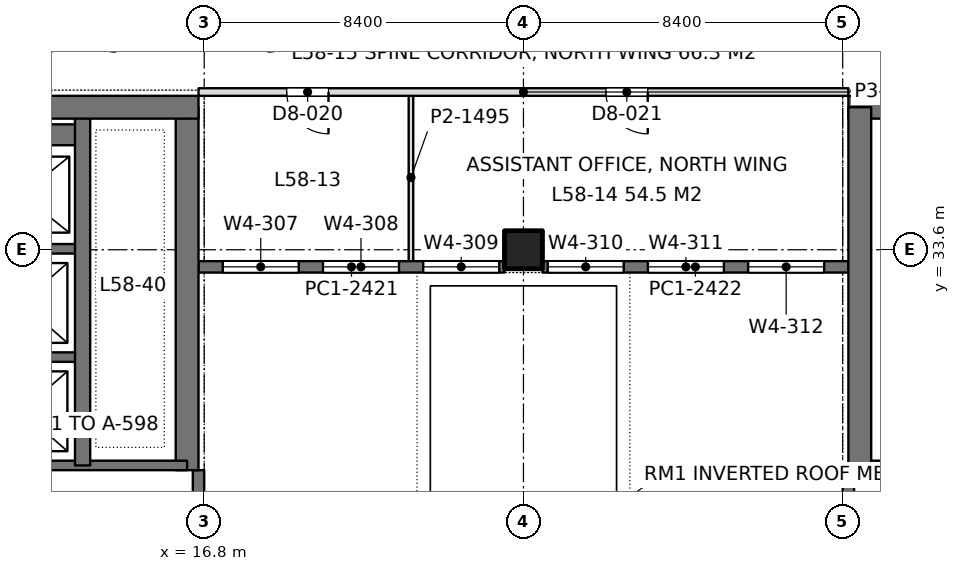
"""IFC4 building model, lengths in metres.
Left out: names, types, materials, properties, quantities, classifications, styles, units other than length and angle.
Written with IfcOpenShell. Run it as: python <this file> out.ifc"""

import sys

from ifc_helpers import new_model, si_unit, direction, frame, frame_2d, origin, origin_2d, place, context, subcontext, project, spatial, rectangle, extrude, element, fill, save


model = new_model("IFC4")
c1 = context("Model", 3, precision=1e-05, world=origin(), true_north=direction((0.0, 1.0)))
c2 = subcontext(c1, "Body", "Model", "MODEL_VIEW")
j1 = project(units=[si_unit("LENGTHUNIT", "METRE"), si_unit("PLANEANGLEUNIT", "RADIAN")], contexts=[c1])
p1 = place(None, origin())
s1 = spatial("IfcSite", under=j1, at=p1, CompositionType="ELEMENT")
p2 = place(p1, origin())
s2 = spatial("IfcBuilding", under=s1, at=p2, CompositionType="ELEMENT")
p3 = place(p2, frame((0.0, 0.0, 254.7)))
s3 = spatial("IfcBuildingStorey", under=s2, at=p3, CompositionType="ELEMENT", Elevation=254.7)
p4 = place(p3, frame((25.2, 33.6, 0.0), z_axis=(0.0, 0.0, 1.0), x_axis=(1.0, 0.0, 0.0)))
e1 = element("IfcColumn", 1, at=p4, inside=s3, PredefinedType="COLUMN", context=c2, shape_type="SweptSolid", body=[
    extrude(rectangle(XDim=1.0, YDim=1.0, at=origin_2d()), origin(), (0.0, 0.0, 1.0), 4.5),
])
p5 = place(p3, frame((-1.05, 37.35, 0.0), z_axis=(0.0, 0.0, 1.0), x_axis=(1.0, 0.0, 0.0)))
e2 = element("IfcWall", 2, at=p5, inside=s3, PredefinedType="SHEAR", context=c2, shape_type="SweptSolid", body=[
    extrude(rectangle(XDim=17.7, YDim=0.6, at=frame_2d((8.85, 0.0))), origin(), (0.0, 0.0, 1.0), 4.5),
])
p6 = place(p5, frame((8.8, 0.0, 0.0)))
e3 = element("IfcOpeningElement", 3, at=p6, cuts=e2, PredefinedType="OPENING", context=c2, shape_type="SweptSolid", body=[
    extrude(rectangle(XDim=1.8, YDim=2.4, at=frame_2d((0.9, 1.2))), frame((0.0, 0.31, 0.0), z_axis=(0.0, -1.0, 0.0), x_axis=(1.0, 0.0, 0.0)), (0.0, 0.0, 1.0), 0.62),
])
p7 = place(p3, frame((16.35, 27.8, 0.0), z_axis=(0.0, 0.0, 1.0), x_axis=(0.0, 1.0, 0.0)))
e4 = element("IfcWall", 4, at=p7, inside=s3, PredefinedType="SHEAR", context=c2, shape_type="SweptSolid", body=[
    extrude(rectangle(XDim=9.55, YDim=0.6, at=frame_2d((4.775, 0.0))), origin(), (0.0, 0.0, 1.0), 4.5),
])
p8 = place(p3, frame((13.6, 27.925, 0.0), z_axis=(0.0, 0.0, 1.0), x_axis=(0.0, 1.0, 0.0)))
e5 = element("IfcWall", 5, at=p8, inside=s3, PredefinedType="SHEAR", context=c2, shape_type="SweptSolid", body=[
    extrude(rectangle(XDim=9.425, YDim=0.4, at=frame_2d((4.712, 0.0))), origin(), (0.0, 0.0, 1.0), 4.5),
])
p9 = place(p3, frame((10.4, 27.925, 0.0), z_axis=(0.0, 0.0, 1.0), x_axis=(1.0, 0.0, 0.0)))
e6 = element("IfcWall", 6, at=p9, inside=s3, PredefinedType="SHEAR", context=c2, shape_type="SweptSolid", body=[
    extrude(rectangle(XDim=5.95, YDim=0.25, at=frame_2d((2.975, 0.0))), origin(), (0.0, 0.0, 1.0), 4.5),
])
for number, where, z_axis, x_axis in (
    (7, (10.4, 30.775, 0.0), (0.0, 0.0, 1.0), (1.0, 0.0, 0.0)),
    (8, (10.4, 33.625, 0.0), (0.0, 0.0, 1.0), (1.0, 0.0, 0.0)),
):
    element("IfcWall", number, at=place(p3, frame(where, z_axis=z_axis, x_axis=x_axis)), inside=s3, PredefinedType="SHEAR", context=c2, shape_type="SweptSolid", body=[
        extrude(rectangle(XDim=3.2, YDim=0.25, at=frame_2d((1.6, 0.0))), origin(), (0.0, 0.0, 1.0), 4.5),
    ])
p10 = place(p3, frame((10.4, 36.625, 0.0), z_axis=(0.0, 0.0, 1.0), x_axis=(1.0, 0.0, 0.0)))
e9 = element("IfcWall", 9, at=p10, inside=s3, PredefinedType="SHEAR", context=c2, shape_type="SweptSolid", body=[
    extrude(rectangle(XDim=3.2, YDim=0.55, at=frame_2d((1.6, 0.0))), origin(), (0.0, 0.0, 1.0), 4.5),
])
p11 = place(p3, frame((33.75, 37.35, 0.0), z_axis=(0.0, 0.0, 1.0), x_axis=(1.0, 0.0, 0.0)))
e10 = element("IfcWall", 10, at=p11, inside=s3, PredefinedType="SHEAR", context=c2, shape_type="SweptSolid", body=[
    extrude(rectangle(XDim=17.7, YDim=0.6, at=frame_2d((8.85, 0.0))), origin(), (0.0, 0.0, 1.0), 4.5),
])
p12 = place(p11, frame((7.1, 0.0, 0.0)))
e11 = element("IfcOpeningElement", 11, at=p12, cuts=e10, PredefinedType="OPENING", context=c2, shape_type="SweptSolid", body=[
    extrude(rectangle(XDim=1.8, YDim=2.4, at=frame_2d((0.9, 1.2))), frame((0.0, 0.31, 0.0), z_axis=(0.0, -1.0, 0.0), x_axis=(1.0, 0.0, 0.0)), (0.0, 0.0, 1.0), 0.62),
])
p13 = place(p3, frame((34.05, 27.8, 0.0), z_axis=(0.0, 0.0, 1.0), x_axis=(0.0, 1.0, 0.0)))
e12 = element("IfcWall", 12, at=p13, inside=s3, PredefinedType="SHEAR", context=c2, shape_type="SweptSolid", body=[
    extrude(rectangle(XDim=9.55, YDim=0.6, at=frame_2d((4.775, 0.0))), origin(), (0.0, 0.0, 1.0), 4.5),
])
p14 = place(p3, frame((40.0, 27.925, 0.0), z_axis=(0.0, 0.0, 1.0), x_axis=(-1.0, 0.0, 0.0)))
e13 = element("IfcWall", 13, at=p14, inside=s3, PredefinedType="SHEAR", context=c2, shape_type="SweptSolid", body=[
    extrude(rectangle(XDim=5.95, YDim=0.25, at=frame_2d((2.975, 0.0))), origin(), (0.0, 0.0, 1.0), 4.5),
])
p15 = place(p3, frame((16.65, 17.1, 0.0), z_axis=(0.0, 0.0, 1.0), x_axis=(0.0, 1.0, 0.0)))
e14 = element("IfcWall", 14, at=p15, inside=s3, PredefinedType="SOLIDWALL", context=c2, shape_type="SweptSolid", body=[
    extrude(rectangle(XDim=10.7, YDim=0.3, at=frame_2d((5.35, 0.0))), origin(), (0.0, 0.0, 1.0), 4.35),
])
p16 = place(p15, frame((0.55, 0.0, 0.9)))
e15 = element("IfcOpeningElement", 15, at=p16, cuts=e14, PredefinedType="OPENING", context=c2, shape_type="SweptSolid", body=[
    extrude(rectangle(XDim=2.0, YDim=1.9, at=frame_2d((1.0, 0.95))), frame((0.0, 0.16, 0.0), z_axis=(0.0, -1.0, 0.0), x_axis=(1.0, 0.0, 0.0)), (0.0, 0.0, 1.0), 0.32),
])
p17 = place(p15, frame((2.9, 0.0, 0.9)))
e16 = element("IfcOpeningElement", 16, at=p17, cuts=e14, PredefinedType="OPENING", context=c2, shape_type="SweptSolid", body=[
    extrude(rectangle(XDim=2.0, YDim=1.9, at=frame_2d((1.0, 0.95))), frame((0.0, 0.16, 0.0), z_axis=(0.0, -1.0, 0.0), x_axis=(1.0, 0.0, 0.0)), (0.0, 0.0, 1.0), 0.32),
])
p18 = place(p15, frame((7.675, 0.0, 0.9)))
e17 = element("IfcOpeningElement", 17, at=p18, cuts=e14, PredefinedType="OPENING", context=c2, shape_type="SweptSolid", body=[
    extrude(rectangle(XDim=2.0, YDim=1.9, at=frame_2d((1.0, 0.95))), frame((0.0, 0.16, 0.0), z_axis=(0.0, -1.0, 0.0), x_axis=(1.0, 0.0, 0.0)), (0.0, 0.0, 1.0), 0.32),
])
p19 = place(p3, frame((33.75, 17.1, 0.0), z_axis=(0.0, 0.0, 1.0), x_axis=(0.0, 1.0, 0.0)))
e18 = element("IfcWall", 18, at=p19, inside=s3, PredefinedType="SOLIDWALL", context=c2, shape_type="SweptSolid", body=[
    extrude(rectangle(XDim=10.7, YDim=0.3, at=frame_2d((5.35, 0.0))), origin(), (0.0, 0.0, 1.0), 4.35),
])
p20 = place(p19, frame((0.55, 0.0, 0.9)))
e19 = element("IfcOpeningElement", 19, at=p20, cuts=e18, PredefinedType="OPENING", context=c2, shape_type="SweptSolid", body=[
    extrude(rectangle(XDim=2.0, YDim=1.9, at=frame_2d((1.0, 0.95))), frame((0.0, 0.16, 0.0), z_axis=(0.0, -1.0, 0.0), x_axis=(1.0, 0.0, 0.0)), (0.0, 0.0, 1.0), 0.32),
])
p21 = place(p19, frame((2.9, 0.0, 0.9)))
e20 = element("IfcOpeningElement", 20, at=p21, cuts=e18, PredefinedType="OPENING", context=c2, shape_type="SweptSolid", body=[
    extrude(rectangle(XDim=2.0, YDim=1.9, at=frame_2d((1.0, 0.95))), frame((0.0, 0.16, 0.0), z_axis=(0.0, -1.0, 0.0), x_axis=(1.0, 0.0, 0.0)), (0.0, 0.0, 1.0), 0.32),
])
p22 = place(p19, frame((7.675, 0.0, 0.9)))
e21 = element("IfcOpeningElement", 21, at=p22, cuts=e18, PredefinedType="OPENING", context=c2, shape_type="SweptSolid", body=[
    extrude(rectangle(XDim=2.0, YDim=1.9, at=frame_2d((1.0, 0.95))), frame((0.0, 0.16, 0.0), z_axis=(0.0, -1.0, 0.0), x_axis=(1.0, 0.0, 0.0)), (0.0, 0.0, 1.0), 0.32),
])
p23 = place(p3, frame((16.65, 33.15, 0.0), z_axis=(0.0, 0.0, 1.0), x_axis=(1.0, 0.0, 0.0)))
e22 = element("IfcWall", 22, at=p23, inside=s3, PredefinedType="SOLIDWALL", context=c2, shape_type="SweptSolid", body=[
    extrude(rectangle(XDim=8.05, YDim=0.3, at=frame_2d((4.025, 0.0))), origin(), (0.0, 0.0, 1.0), 4.35),
])
p24 = place(p23, frame((0.637, 0.0, 0.9)))
e23 = element("IfcOpeningElement", 23, at=p24, cuts=e22, PredefinedType="OPENING", context=c2, shape_type="SweptSolid", body=[
    extrude(rectangle(XDim=2.0, YDim=1.9, at=frame_2d((1.0, 0.95))), frame((0.0, 0.16, 0.0), z_axis=(0.0, -1.0, 0.0), x_axis=(1.0, 0.0, 0.0)), (0.0, 0.0, 1.0), 0.32),
])
p25 = place(p23, frame((3.275, 0.0, 0.9)))
e24 = element("IfcOpeningElement", 24, at=p25, cuts=e22, PredefinedType="OPENING", context=c2, shape_type="SweptSolid", body=[
    extrude(rectangle(XDim=2.0, YDim=1.9, at=frame_2d((1.0, 0.95))), frame((0.0, 0.16, 0.0), z_axis=(0.0, -1.0, 0.0), x_axis=(1.0, 0.0, 0.0)), (0.0, 0.0, 1.0), 0.32),
])
p26 = place(p23, frame((5.913, 0.0, 0.9)))
e25 = element("IfcOpeningElement", 25, at=p26, cuts=e22, PredefinedType="OPENING", context=c2, shape_type="SweptSolid", body=[
    extrude(rectangle(XDim=2.0, YDim=1.9, at=frame_2d((1.0, 0.95))), frame((0.0, 0.16, 0.0), z_axis=(0.0, -1.0, 0.0), x_axis=(1.0, 0.0, 0.0)), (0.0, 0.0, 1.0), 0.32),
])
p27 = place(p3, frame((25.7, 33.15, 0.0), z_axis=(0.0, 0.0, 1.0), x_axis=(1.0, 0.0, 0.0)))
e26 = element("IfcWall", 26, at=p27, inside=s3, PredefinedType="SOLIDWALL", context=c2, shape_type="SweptSolid", body=[
    extrude(rectangle(XDim=8.05, YDim=0.3, at=frame_2d((4.025, 0.0))), origin(), (0.0, 0.0, 1.0), 4.35),
])
p28 = place(p27, frame((0.137, 0.0, 0.9)))
e27 = element("IfcOpeningElement", 27, at=p28, cuts=e26, PredefinedType="OPENING", context=c2, shape_type="SweptSolid", body=[
    extrude(rectangle(XDim=2.0, YDim=1.9, at=frame_2d((1.0, 0.95))), frame((0.0, 0.16, 0.0), z_axis=(0.0, -1.0, 0.0), x_axis=(1.0, 0.0, 0.0)), (0.0, 0.0, 1.0), 0.32),
])
p29 = place(p27, frame((2.775, 0.0, 0.9)))
e28 = element("IfcOpeningElement", 28, at=p29, cuts=e26, PredefinedType="OPENING", context=c2, shape_type="SweptSolid", body=[
    extrude(rectangle(XDim=2.0, YDim=1.9, at=frame_2d((1.0, 0.95))), frame((0.0, 0.16, 0.0), z_axis=(0.0, -1.0, 0.0), x_axis=(1.0, 0.0, 0.0)), (0.0, 0.0, 1.0), 0.32),
])
p30 = place(p27, frame((5.413, 0.0, 0.9)))
e29 = element("IfcOpeningElement", 29, at=p30, cuts=e26, PredefinedType="OPENING", context=c2, shape_type="SweptSolid", body=[
    extrude(rectangle(XDim=2.0, YDim=1.9, at=frame_2d((1.0, 0.95))), frame((0.0, 0.16, 0.0), z_axis=(0.0, -1.0, 0.0), x_axis=(1.0, 0.0, 0.0)), (0.0, 0.0, 1.0), 0.32),
])
p31 = place(p3, frame((22.24, 33.298, 0.0), z_axis=(0.0, 0.0, 1.0), x_axis=(0.0, 1.0, 0.0)))
e30 = element("IfcWall", 30, at=p31, inside=s3, PredefinedType="PARTITIONING", context=c2, shape_type="SweptSolid", body=[
    extrude(rectangle(XDim=4.404, YDim=0.12, at=frame_2d((2.202, 0.0))), origin(), (0.0, 0.0, 1.0), 3.66),
])
p32 = place(p3, frame((16.65, 37.75, 0.0), z_axis=(0.0, 0.0, 1.0), x_axis=(1.0, 0.0, 0.0)))
e31 = element("IfcWall", 31, at=p32, inside=s3, PredefinedType="PARTITIONING", context=c2, shape_type="SweptSolid", body=[
    extrude(rectangle(XDim=17.1, YDim=0.2, at=frame_2d((8.55, 0.0))), origin(), (0.0, 0.0, 1.0), 3.8),
])
p33 = place(p32, frame((2.32, 0.0, 0.0)))
e32 = element("IfcOpeningElement", 32, at=p33, cuts=e31, PredefinedType="OPENING", context=c2, shape_type="SweptSolid", body=[
    extrude(rectangle(XDim=1.1, YDim=2.4, at=frame_2d((0.55, 1.2))), frame((0.0, 0.11, 0.0), z_axis=(0.0, -1.0, 0.0), x_axis=(1.0, 0.0, 0.0)), (0.0, 0.0, 1.0), 0.22),
])
p34 = place(p32, frame((10.72, 0.0, 0.0)))
e33 = element("IfcOpeningElement", 33, at=p34, cuts=e31, PredefinedType="OPENING", context=c2, shape_type="SweptSolid", body=[
    extrude(rectangle(XDim=1.1, YDim=2.4, at=frame_2d((0.55, 1.2))), frame((0.0, 0.11, 0.0), z_axis=(0.0, -1.0, 0.0), x_axis=(1.0, 0.0, 0.0)), (0.0, 0.0, 1.0), 0.22),
])
p35 = place(p24, origin())
e34 = element("IfcWindow", 34, at=p35, inside=s3, PartitioningType="SINGLE_PANEL", PredefinedType="WINDOW", context=c2, shape_type="SweptSolid", body=[
    extrude(rectangle(XDim=2.0, YDim=1.9, at=frame_2d((1.0, 0.95))), frame((0.0, 0.03, 0.0), z_axis=(0.0, -1.0, 0.0), x_axis=(1.0, 0.0, 0.0)), (0.0, 0.0, 1.0), 0.06),
])
fill(e23, e34)
p36 = place(p25, origin())
e35 = element("IfcWindow", 35, at=p36, inside=s3, PartitioningType="SINGLE_PANEL", PredefinedType="WINDOW", context=c2, shape_type="SweptSolid", body=[
    extrude(rectangle(XDim=2.0, YDim=1.9, at=frame_2d((1.0, 0.95))), frame((0.0, 0.03, 0.0), z_axis=(0.0, -1.0, 0.0), x_axis=(1.0, 0.0, 0.0)), (0.0, 0.0, 1.0), 0.06),
])
fill(e24, e35)
p37 = place(p26, origin())
e36 = element("IfcWindow", 36, at=p37, inside=s3, PartitioningType="SINGLE_PANEL", PredefinedType="WINDOW", context=c2, shape_type="SweptSolid", body=[
    extrude(rectangle(XDim=2.0, YDim=1.9, at=frame_2d((1.0, 0.95))), frame((0.0, 0.03, 0.0), z_axis=(0.0, -1.0, 0.0), x_axis=(1.0, 0.0, 0.0)), (0.0, 0.0, 1.0), 0.06),
])
fill(e25, e36)
p38 = place(p28, origin())
e37 = element("IfcWindow", 37, at=p38, inside=s3, PartitioningType="SINGLE_PANEL", PredefinedType="WINDOW", context=c2, shape_type="SweptSolid", body=[
    extrude(rectangle(XDim=2.0, YDim=1.9, at=frame_2d((1.0, 0.95))), frame((0.0, 0.03, 0.0), z_axis=(0.0, -1.0, 0.0), x_axis=(1.0, 0.0, 0.0)), (0.0, 0.0, 1.0), 0.06),
])
fill(e27, e37)
p39 = place(p29, origin())
e38 = element("IfcWindow", 38, at=p39, inside=s3, PartitioningType="SINGLE_PANEL", PredefinedType="WINDOW", context=c2, shape_type="SweptSolid", body=[
    extrude(rectangle(XDim=2.0, YDim=1.9, at=frame_2d((1.0, 0.95))), frame((0.0, 0.03, 0.0), z_axis=(0.0, -1.0, 0.0), x_axis=(1.0, 0.0, 0.0)), (0.0, 0.0, 1.0), 0.06),
])
fill(e28, e38)
p40 = place(p30, origin())
e39 = element("IfcWindow", 39, at=p40, inside=s3, PartitioningType="SINGLE_PANEL", PredefinedType="WINDOW", context=c2, shape_type="SweptSolid", body=[
    extrude(rectangle(XDim=2.0, YDim=1.9, at=frame_2d((1.0, 0.95))), frame((0.0, 0.03, 0.0), z_axis=(0.0, -1.0, 0.0), x_axis=(1.0, 0.0, 0.0)), (0.0, 0.0, 1.0), 0.06),
])
fill(e29, e39)
p41 = place(p33, frame((1.1, 0.0, 0.0), z_axis=(0.0, 0.0, 1.0), x_axis=(-1.0, 0.0, 0.0)))
e40 = element("IfcDoor", 40, at=p41, inside=s3, OperationType="SINGLE_SWING_LEFT", PredefinedType="DOOR", context=c2, shape_type="SweptSolid", body=[
    extrude(rectangle(XDim=1.1, YDim=2.4, at=frame_2d((0.55, 1.2))), frame((0.0, 0.025, 0.0), z_axis=(0.0, -1.0, 0.0), x_axis=(1.0, 0.0, 0.0)), (0.0, 0.0, 1.0), 0.05),
])
fill(e32, e40)
p42 = place(p34, frame((1.1, 0.0, 0.0), z_axis=(0.0, 0.0, 1.0), x_axis=(-1.0, 0.0, 0.0)))
e41 = element("IfcDoor", 41, at=p42, inside=s3, OperationType="SINGLE_SWING_LEFT", PredefinedType="DOOR", context=c2, shape_type="SweptSolid", body=[
    extrude(rectangle(XDim=1.1, YDim=2.4, at=frame_2d((0.55, 1.2))), frame((0.0, 0.025, 0.0), z_axis=(0.0, -1.0, 0.0), x_axis=(1.0, 0.0, 0.0)), (0.0, 0.0, 1.0), 0.05),
])
fill(e33, e41)
save(model, sys.argv[1])
